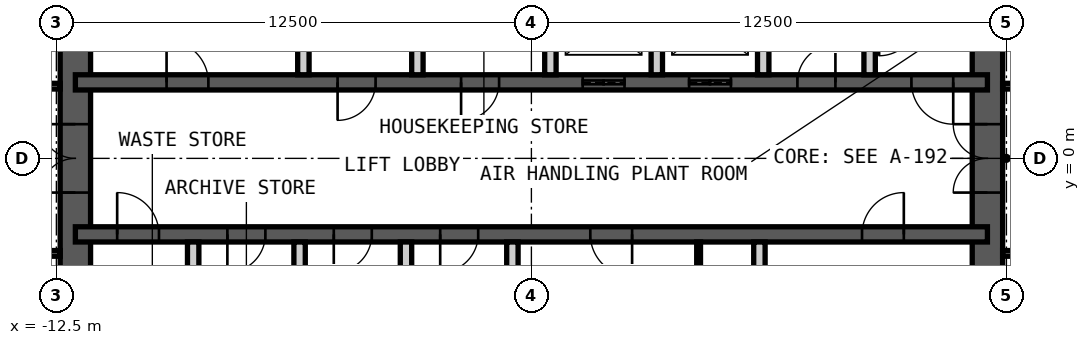
"""IFC4 building model, lengths in metres.
Left out: names, types, materials, properties, quantities, classifications, styles, units other than length and angle.
Written with IfcOpenShell. Run it as: python <this file> out.ifc"""

import sys

from ifc_helpers import new_model, si_unit, direction, frame, frame_2d, origin, place, context, subcontext, project, spatial, rectangle, extrude, element, fill, save


model = new_model("IFC4")
c1 = context("Model", 3, precision=1e-05, world=origin(), true_north=direction((0.0, 1.0)))
c2 = subcontext(c1, "Body", "Model", "MODEL_VIEW")
j1 = project(units=[si_unit("LENGTHUNIT", "METRE"), si_unit("PLANEANGLEUNIT", "RADIAN")], contexts=[c1])
p1 = place(None, origin())
s1 = spatial("IfcSite", under=j1, at=p1, CompositionType="ELEMENT")
p2 = place(p1, origin())
s2 = spatial("IfcBuilding", under=s1, at=p2, CompositionType="ELEMENT")
p3 = place(p2, frame((0.0, 0.0, 333.4)))
s3 = spatial("IfcBuildingStorey", under=s2, at=p3, CompositionType="ELEMENT", Elevation=333.4)
p4 = place(p3, frame((12.0, -9.0, 0.0), z_axis=(0.0, 0.0, 1.0), x_axis=(0.0, 1.0, 0.0)))
e1 = element("IfcWall", 1, at=p4, inside=s3, PredefinedType="SHEAR", context=c2, shape_type="SweptSolid", body=[
    extrude(rectangle(XDim=18.0, YDim=0.8, at=frame_2d((9.0, 0.0))), origin(), (0.0, 0.0, 1.0), 4.2),
])
p5 = place(p4, frame((8.1, 0.0, 0.0)))
e2 = element("IfcOpeningElement", 2, at=p5, cuts=e1, PredefinedType="OPENING", context=c2, shape_type="SweptSolid", body=[
    extrude(rectangle(XDim=1.8, YDim=2.1, at=frame_2d((0.9, 1.05))), frame((0.0, 0.41, 0.0), z_axis=(0.0, -1.0, 0.0), x_axis=(1.0, 0.0, 0.0)), (0.0, 0.0, 1.0), 0.82),
])
p6 = place(p3, frame((-12.0, -9.0, 0.0), z_axis=(0.0, 0.0, 1.0), x_axis=(0.0, 1.0, 0.0)))
e3 = element("IfcWall", 3, at=p6, inside=s3, PredefinedType="SHEAR", context=c2, shape_type="SweptSolid", body=[
    extrude(rectangle(XDim=18.0, YDim=0.8, at=frame_2d((9.0, 0.0))), origin(), (0.0, 0.0, 1.0), 4.2),
])
p7 = place(p6, frame((8.1, 0.0, 0.0)))
e4 = element("IfcOpeningElement", 4, at=p7, cuts=e3, PredefinedType="OPENING", context=c2, shape_type="SweptSolid", body=[
    extrude(rectangle(XDim=1.8, YDim=2.1, at=frame_2d((0.9, 1.05))), frame((0.0, 0.41, 0.0), z_axis=(0.0, -1.0, 0.0), x_axis=(1.0, 0.0, 0.0)), (0.0, 0.0, 1.0), 0.82),
])
p8 = place(p3, frame((-12.0, 2.0, 0.0), z_axis=(0.0, 0.0, 1.0), x_axis=(1.0, 0.0, 0.0)))
e5 = element("IfcWall", 5, at=p8, inside=s3, PredefinedType="SHEAR", context=c2, shape_type="SweptSolid", body=[
    extrude(rectangle(XDim=24.0, YDim=0.4, at=frame_2d((12.0, 0.0))), origin(), (0.0, 0.0, 1.0), 4.2),
])
p9 = place(p8, frame((2.4, 0.0, 0.0)))
e6 = element("IfcOpeningElement", 6, at=p9, cuts=e5, PredefinedType="OPENING", context=c2, shape_type="SweptSolid", body=[
    extrude(rectangle(XDim=1.1, YDim=2.1, at=frame_2d((0.55, 1.05))), frame((0.0, 0.21, 0.0), z_axis=(0.0, -1.0, 0.0), x_axis=(1.0, 0.0, 0.0)), (0.0, 0.0, 1.0), 0.42),
])
p10 = place(p8, frame((22.0, 0.0, 0.0)))
e7 = element("IfcOpeningElement", 7, at=p10, cuts=e5, PredefinedType="OPENING", context=c2, shape_type="SweptSolid", body=[
    extrude(rectangle(XDim=1.1, YDim=2.1, at=frame_2d((0.55, 1.05))), frame((0.0, 0.21, 0.0), z_axis=(0.0, -1.0, 0.0), x_axis=(1.0, 0.0, 0.0)), (0.0, 0.0, 1.0), 0.42),
])
p11 = place(p8, frame((10.15, 0.0, 0.0)))
e8 = element("IfcOpeningElement", 8, at=p11, cuts=e5, PredefinedType="OPENING", context=c2, shape_type="SweptSolid", body=[
    extrude(rectangle(XDim=1.0, YDim=2.1, at=frame_2d((0.5, 1.05))), frame((0.0, 0.21, 0.0), z_axis=(0.0, -1.0, 0.0), x_axis=(1.0, 0.0, 0.0)), (0.0, 0.0, 1.0), 0.42),
])
p12 = place(p8, frame((6.9, 0.0, 0.0)))
e9 = element("IfcOpeningElement", 9, at=p12, cuts=e5, PredefinedType="OPENING", context=c2, shape_type="SweptSolid", body=[
    extrude(rectangle(XDim=1.0, YDim=2.1, at=frame_2d((0.5, 1.05))), frame((0.0, 0.21, 0.0), z_axis=(0.0, -1.0, 0.0), x_axis=(1.0, 0.0, 0.0)), (0.0, 0.0, 1.0), 0.42),
])
p13 = place(p8, frame((13.35, 0.0, 0.0)))
e10 = element("IfcOpeningElement", 10, at=p13, cuts=e5, PredefinedType="OPENING", context=c2, shape_type="SweptSolid", body=[
    extrude(rectangle(XDim=1.1, YDim=2.4, at=frame_2d((0.55, 1.2))), frame((0.0, 0.21, 0.0), z_axis=(0.0, -1.0, 0.0), x_axis=(1.0, 0.0, 0.0)), (0.0, 0.0, 1.0), 0.42),
])
p14 = place(p8, frame((16.15, 0.0, 0.0)))
e11 = element("IfcOpeningElement", 11, at=p14, cuts=e5, PredefinedType="OPENING", context=c2, shape_type="SweptSolid", body=[
    extrude(rectangle(XDim=1.1, YDim=2.4, at=frame_2d((0.55, 1.2))), frame((0.0, 0.21, 0.0), z_axis=(0.0, -1.0, 0.0), x_axis=(1.0, 0.0, 0.0)), (0.0, 0.0, 1.0), 0.42),
])
p15 = place(p8, frame((19.0, 0.0, 0.0)))
e12 = element("IfcOpeningElement", 12, at=p15, cuts=e5, PredefinedType="OPENING", context=c2, shape_type="SweptSolid", body=[
    extrude(rectangle(XDim=1.0, YDim=2.1, at=frame_2d((0.5, 1.05))), frame((0.0, 0.21, 0.0), z_axis=(0.0, -1.0, 0.0), x_axis=(1.0, 0.0, 0.0)), (0.0, 0.0, 1.0), 0.42),
])
p16 = place(p3, frame((-12.0, -2.0, 0.0), z_axis=(0.0, 0.0, 1.0), x_axis=(1.0, 0.0, 0.0)))
e13 = element("IfcWall", 13, at=p16, inside=s3, PredefinedType="SHEAR", context=c2, shape_type="SweptSolid", body=[
    extrude(rectangle(XDim=24.0, YDim=0.4, at=frame_2d((12.0, 0.0))), origin(), (0.0, 0.0, 1.0), 4.2),
])
p17 = place(p16, frame((1.1, 0.0, 0.0)))
e14 = element("IfcOpeningElement", 14, at=p17, cuts=e13, PredefinedType="OPENING", context=c2, shape_type="SweptSolid", body=[
    extrude(rectangle(XDim=1.1, YDim=2.1, at=frame_2d((0.55, 1.05))), frame((0.0, 0.21, 0.0), z_axis=(0.0, -1.0, 0.0), x_axis=(1.0, 0.0, 0.0)), (0.0, 0.0, 1.0), 0.42),
])
p18 = place(p16, frame((13.55, 0.0, 0.0)))
e15 = element("IfcOpeningElement", 15, at=p18, cuts=e13, PredefinedType="OPENING", context=c2, shape_type="SweptSolid", body=[
    extrude(rectangle(XDim=1.1, YDim=2.1, at=frame_2d((0.55, 1.05))), frame((0.0, 0.21, 0.0), z_axis=(0.0, -1.0, 0.0), x_axis=(1.0, 0.0, 0.0)), (0.0, 0.0, 1.0), 0.42),
])
p19 = place(p16, frame((20.7, 0.0, 0.0)))
e16 = element("IfcOpeningElement", 16, at=p19, cuts=e13, PredefinedType="OPENING", context=c2, shape_type="SweptSolid", body=[
    extrude(rectangle(XDim=1.1, YDim=2.1, at=frame_2d((0.55, 1.05))), frame((0.0, 0.21, 0.0), z_axis=(0.0, -1.0, 0.0), x_axis=(1.0, 0.0, 0.0)), (0.0, 0.0, 1.0), 0.42),
])
p20 = place(p16, frame((4.0, 0.0, 0.0)))
e17 = element("IfcOpeningElement", 17, at=p20, cuts=e13, PredefinedType="OPENING", context=c2, shape_type="SweptSolid", body=[
    extrude(rectangle(XDim=1.0, YDim=2.1, at=frame_2d((0.5, 1.05))), frame((0.0, 0.21, 0.0), z_axis=(0.0, -1.0, 0.0), x_axis=(1.0, 0.0, 0.0)), (0.0, 0.0, 1.0), 0.42),
])
p21 = place(p16, frame((6.8, 0.0, 0.0)))
e18 = element("IfcOpeningElement", 18, at=p21, cuts=e13, PredefinedType="OPENING", context=c2, shape_type="SweptSolid", body=[
    extrude(rectangle(XDim=1.0, YDim=2.1, at=frame_2d((0.5, 1.05))), frame((0.0, 0.21, 0.0), z_axis=(0.0, -1.0, 0.0), x_axis=(1.0, 0.0, 0.0)), (0.0, 0.0, 1.0), 0.42),
])
p22 = place(p16, frame((9.6, 0.0, 0.0)))
e19 = element("IfcOpeningElement", 19, at=p22, cuts=e13, PredefinedType="OPENING", context=c2, shape_type="SweptSolid", body=[
    extrude(rectangle(XDim=1.0, YDim=2.1, at=frame_2d((0.5, 1.05))), frame((0.0, 0.21, 0.0), z_axis=(0.0, -1.0, 0.0), x_axis=(1.0, 0.0, 0.0)), (0.0, 0.0, 1.0), 0.42),
])
for number, where, z_axis, x_axis in (
    (20, (-6.0, 2.2, 0.0), (0.0, 0.0, 1.0), (0.0, 1.0, 0.0)),
    (21, (-3.0, 2.2, 0.0), (0.0, 0.0, 1.0), (0.0, 1.0, 0.0)),
    (22, (0.5, 2.2, 0.0), (0.0, 0.0, 1.0), (0.0, 1.0, 0.0)),
    (23, (3.3, 2.2, 0.0), (0.0, 0.0, 1.0), (0.0, 1.0, 0.0)),
    (24, (6.1, 2.2, 0.0), (0.0, 0.0, 1.0), (0.0, 1.0, 0.0)),
    (25, (8.9, 2.2, 0.0), (0.0, 0.0, 1.0), (0.0, 1.0, 0.0)),
    (26, (-8.9, -4.85, 0.0), (0.0, 0.0, 1.0), (0.0, 1.0, 0.0)),
    (27, (-6.1, -4.85, 0.0), (0.0, 0.0, 1.0), (0.0, 1.0, 0.0)),
    (28, (-3.3, -4.85, 0.0), (0.0, 0.0, 1.0), (0.0, 1.0, 0.0)),
    (29, (-0.5, -4.85, 0.0), (0.0, 0.0, 1.0), (0.0, 1.0, 0.0)),
    (30, (6.0, -4.85, 0.0), (0.0, 0.0, 1.0), (0.0, 1.0, 0.0)),
):
    element("IfcWall", number, at=place(p3, frame(where, z_axis=z_axis, x_axis=x_axis)), inside=s3, PredefinedType="PARTITIONING", context=c2, shape_type="SweptSolid", body=[
        extrude(rectangle(XDim=2.65, YDim=0.3, at=frame_2d((1.325, 0.0))), origin(), (0.0, 0.0, 1.0), 3.98),
    ])
p23 = place(p3, frame((4.4, -4.85, 0.0), z_axis=(0.0, 0.0, 1.0), x_axis=(0.0, 1.0, 0.0)))
e31 = element("IfcWall", 31, at=p23, inside=s3, PredefinedType="PARTITIONING", context=c2, shape_type="SweptSolid", body=[
    extrude(rectangle(XDim=2.65, YDim=0.1, at=frame_2d((1.325, 0.0))), origin(), (0.0, 0.0, 1.0), 3.98),
])
p24 = place(p23, frame((0.1, 0.0, 0.0)))
e32 = element("IfcOpeningElement", 32, at=p24, cuts=e31, PredefinedType="OPENING", context=c2, shape_type="SweptSolid", body=[
    extrude(rectangle(XDim=1.0, YDim=2.4, at=frame_2d((0.5, 1.2))), frame((0.0, 0.06, 0.0), z_axis=(0.0, -1.0, 0.0), x_axis=(1.0, 0.0, 0.0)), (0.0, 0.0, 1.0), 0.12),
])
p25 = place(p3, frame((12.4, 1.9, 0.0), z_axis=(0.0, 0.0, 1.0), x_axis=(1.0, 0.0, 0.0)))
e33 = element("IfcWall", 33, at=p25, inside=s3, PredefinedType="PARTITIONING", context=c2, shape_type="SweptSolid", body=[
    extrude(rectangle(XDim=2.2, YDim=0.15, at=frame_2d((1.1, 0.0))), origin(), (0.0, 0.0, 1.0), 2.72),
])
p26 = place(p3, frame((12.4, -2.5, 0.0), z_axis=(0.0, 0.0, 1.0), x_axis=(1.0, 0.0, 0.0)))
e34 = element("IfcWall", 34, at=p26, inside=s3, PredefinedType="PARTITIONING", context=c2, shape_type="SweptSolid", body=[
    extrude(rectangle(XDim=2.2, YDim=0.15, at=frame_2d((1.1, 0.0))), origin(), (0.0, 0.0, 1.0), 3.02),
])
for number, where, z_axis, x_axis in (
    (35, (-12.4, 1.9, 0.0), (0.0, 0.0, 1.0), (-1.0, 0.0, 0.0)),
    (36, (-12.4, -2.5, 0.0), (0.0, 0.0, 1.0), (-1.0, 0.0, 0.0)),
):
    element("IfcWall", number, at=place(p3, frame(where, z_axis=z_axis, x_axis=x_axis)), inside=s3, PredefinedType="PARTITIONING", context=c2, shape_type="SweptSolid", body=[
        extrude(rectangle(XDim=2.2, YDim=0.15, at=frame_2d((1.1, 0.0))), origin(), (0.0, 0.0, 1.0), 3.12),
    ])
p27 = place(p9, origin())
e37 = element("IfcDoor", 37, at=p27, inside=s3, OperationType="SINGLE_SWING_RIGHT", PredefinedType="DOOR", context=c2, shape_type="SweptSolid", body=[
    extrude(rectangle(XDim=1.1, YDim=2.1, at=frame_2d((0.55, 1.05))), frame((0.0, 0.025, 0.0), z_axis=(0.0, -1.0, 0.0), x_axis=(1.0, 0.0, 0.0)), (0.0, 0.0, 1.0), 0.05),
])
fill(e6, e37)
p28 = place(p17, origin())
e38 = element("IfcDoor", 38, at=p28, inside=s3, OperationType="SINGLE_SWING_RIGHT", PredefinedType="DOOR", context=c2, shape_type="SweptSolid", body=[
    extrude(rectangle(XDim=1.1, YDim=2.1, at=frame_2d((0.55, 1.05))), frame((0.0, 0.025, 0.0), z_axis=(0.0, -1.0, 0.0), x_axis=(1.0, 0.0, 0.0)), (0.0, 0.0, 1.0), 0.05),
])
fill(e14, e38)
p29 = place(p10, origin())
e39 = element("IfcDoor", 39, at=p29, inside=s3, OperationType="SINGLE_SWING_RIGHT", PredefinedType="DOOR", context=c2, shape_type="SweptSolid", body=[
    extrude(rectangle(XDim=1.1, YDim=2.1, at=frame_2d((0.55, 1.05))), frame((0.0, 0.025, 0.0), z_axis=(0.0, -1.0, 0.0), x_axis=(1.0, 0.0, 0.0)), (0.0, 0.0, 1.0), 0.05),
])
fill(e7, e39)
p30 = place(p11, origin())
e40 = element("IfcDoor", 40, at=p30, inside=s3, OperationType="SINGLE_SWING_LEFT", PredefinedType="DOOR", context=c2, shape_type="SweptSolid", body=[
    extrude(rectangle(XDim=1.0, YDim=2.1, at=frame_2d((0.5, 1.05))), frame((0.0, 0.025, 0.0), z_axis=(0.0, -1.0, 0.0), x_axis=(1.0, 0.0, 0.0)), (0.0, 0.0, 1.0), 0.05),
])
fill(e8, e40)
p31 = place(p18, origin())
e41 = element("IfcDoor", 41, at=p31, inside=s3, OperationType="SINGLE_SWING_RIGHT", PredefinedType="DOOR", context=c2, shape_type="SweptSolid", body=[
    extrude(rectangle(XDim=1.1, YDim=2.1, at=frame_2d((0.55, 1.05))), frame((0.0, 0.025, 0.0), z_axis=(0.0, -1.0, 0.0), x_axis=(1.0, 0.0, 0.0)), (0.0, 0.0, 1.0), 0.05),
])
fill(e15, e41)
p32 = place(p19, origin())
e42 = element("IfcDoor", 42, at=p32, inside=s3, OperationType="SINGLE_SWING_LEFT", PredefinedType="DOOR", context=c2, shape_type="SweptSolid", body=[
    extrude(rectangle(XDim=1.1, YDim=2.1, at=frame_2d((0.55, 1.05))), frame((0.0, 0.025, 0.0), z_axis=(0.0, -1.0, 0.0), x_axis=(1.0, 0.0, 0.0)), (0.0, 0.0, 1.0), 0.05),
])
fill(e16, e42)
p33 = place(p5, origin())
e43 = element("IfcDoor", 43, at=p33, inside=s3, OperationType="DOUBLE_DOOR_DOUBLE_SWING", PredefinedType="DOOR", context=c2, shape_type="SweptSolid", body=[
    extrude(rectangle(XDim=1.8, YDim=2.1, at=frame_2d((0.9, 1.05))), frame((0.0, 0.025, 0.0), z_axis=(0.0, -1.0, 0.0), x_axis=(1.0, 0.0, 0.0)), (0.0, 0.0, 1.0), 0.05),
])
fill(e2, e43)
p34 = place(p7, origin())
e44 = element("IfcDoor", 44, at=p34, inside=s3, OperationType="DOUBLE_DOOR_DOUBLE_SWING", PredefinedType="DOOR", context=c2, shape_type="SweptSolid", body=[
    extrude(rectangle(XDim=1.8, YDim=2.1, at=frame_2d((0.9, 1.05))), frame((0.0, 0.025, 0.0), z_axis=(0.0, -1.0, 0.0), x_axis=(1.0, 0.0, 0.0)), (0.0, 0.0, 1.0), 0.05),
])
fill(e4, e44)
p35 = place(p12, origin())
e45 = element("IfcDoor", 45, at=p35, inside=s3, OperationType="SINGLE_SWING_LEFT", PredefinedType="DOOR", context=c2, shape_type="SweptSolid", body=[
    extrude(rectangle(XDim=1.0, YDim=2.1, at=frame_2d((0.5, 1.05))), frame((0.0, 0.025, 0.0), z_axis=(0.0, -1.0, 0.0), x_axis=(1.0, 0.0, 0.0)), (0.0, 0.0, 1.0), 0.05),
])
fill(e9, e45)
p36 = place(p13, origin())
e46 = element("IfcDoor", 46, at=p36, inside=s3, OperationType="DOUBLE_DOOR_SLIDING", PredefinedType="DOOR", context=c2, shape_type="SweptSolid", body=[
    extrude(rectangle(XDim=1.1, YDim=2.4, at=frame_2d((0.55, 1.2))), frame((0.0, 0.025, 0.0), z_axis=(0.0, -1.0, 0.0), x_axis=(1.0, 0.0, 0.0)), (0.0, 0.0, 1.0), 0.05),
])
fill(e10, e46)
p37 = place(p14, origin())
e47 = element("IfcDoor", 47, at=p37, inside=s3, OperationType="DOUBLE_DOOR_SLIDING", PredefinedType="DOOR", context=c2, shape_type="SweptSolid", body=[
    extrude(rectangle(XDim=1.1, YDim=2.4, at=frame_2d((0.55, 1.2))), frame((0.0, 0.025, 0.0), z_axis=(0.0, -1.0, 0.0), x_axis=(1.0, 0.0, 0.0)), (0.0, 0.0, 1.0), 0.05),
])
fill(e11, e47)
p38 = place(p15, origin())
e48 = element("IfcDoor", 48, at=p38, inside=s3, OperationType="SINGLE_SWING_LEFT", PredefinedType="DOOR", context=c2, shape_type="SweptSolid", body=[
    extrude(rectangle(XDim=1.0, YDim=2.1, at=frame_2d((0.5, 1.05))), frame((0.0, 0.025, 0.0), z_axis=(0.0, -1.0, 0.0), x_axis=(1.0, 0.0, 0.0)), (0.0, 0.0, 1.0), 0.05),
])
fill(e12, e48)
p39 = place(p20, origin())
e49 = element("IfcDoor", 49, at=p39, inside=s3, OperationType="SINGLE_SWING_LEFT", PredefinedType="DOOR", context=c2, shape_type="SweptSolid", body=[
    extrude(rectangle(XDim=1.0, YDim=2.1, at=frame_2d((0.5, 1.05))), frame((0.0, 0.025, 0.0), z_axis=(0.0, -1.0, 0.0), x_axis=(1.0, 0.0, 0.0)), (0.0, 0.0, 1.0), 0.05),
])
fill(e17, e49)
p40 = place(p21, origin())
e50 = element("IfcDoor", 50, at=p40, inside=s3, OperationType="SINGLE_SWING_LEFT", PredefinedType="DOOR", context=c2, shape_type="SweptSolid", body=[
    extrude(rectangle(XDim=1.0, YDim=2.1, at=frame_2d((0.5, 1.05))), frame((0.0, 0.025, 0.0), z_axis=(0.0, -1.0, 0.0), x_axis=(1.0, 0.0, 0.0)), (0.0, 0.0, 1.0), 0.05),
])
fill(e18, e50)
p41 = place(p22, origin())
e51 = element("IfcDoor", 51, at=p41, inside=s3, OperationType="SINGLE_SWING_LEFT", PredefinedType="DOOR", context=c2, shape_type="SweptSolid", body=[
    extrude(rectangle(XDim=1.0, YDim=2.1, at=frame_2d((0.5, 1.05))), frame((0.0, 0.025, 0.0), z_axis=(0.0, -1.0, 0.0), x_axis=(1.0, 0.0, 0.0)), (0.0, 0.0, 1.0), 0.05),
])
fill(e19, e51)
save(model, sys.argv[1])
